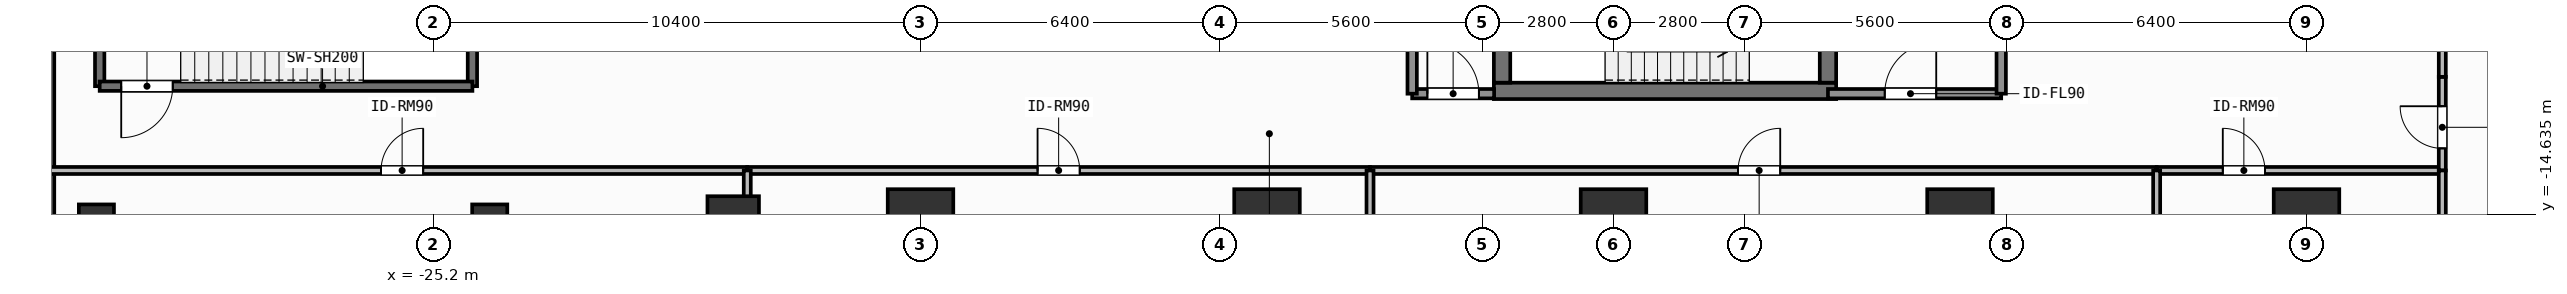
"""IFC4 building model, lengths in metres.
Left out: names, types, materials, properties, quantities, classifications, styles, units other than length and angle.
Written with IfcOpenShell. Run it as: python <this file> out.ifc"""

import sys

from ifc_helpers import new_model, si_unit, direction, frame, frame_2d, origin, origin_2d, place, context, subcontext, project, spatial, rectangle, extrude, element, fill, save


model = new_model("IFC4")
c1 = context("Model", 3, precision=1e-05, world=origin(), true_north=direction((0.0, 1.0)))
c2 = subcontext(c1, "Body", "Model", "MODEL_VIEW")
j1 = project(units=[si_unit("LENGTHUNIT", "METRE"), si_unit("PLANEANGLEUNIT", "RADIAN")], contexts=[c1])
p1 = place(None, origin())
s1 = spatial("IfcSite", under=j1, at=p1, CompositionType="ELEMENT")
p2 = place(p1, origin())
s2 = spatial("IfcBuilding", under=s1, at=p2, CompositionType="ELEMENT")
p3 = place(p2, frame((0.0, 0.0, 9.0)))
s3 = spatial("IfcBuildingStorey", under=s2, at=p3, CompositionType="ELEMENT", Elevation=9.0)
p4 = place(p3, frame((-2.555, -12.0, 0.0), z_axis=(0.0, 0.0, 1.0), x_axis=(1.0, 0.0, 0.0)))
e1 = element("IfcWall", 1, at=p4, inside=s3, PredefinedType="SHEAR", context=c2, shape_type="SweptSolid", body=[
    extrude(rectangle(XDim=7.31, YDim=0.35, at=frame_2d((3.655, 0.0))), origin(), (0.0, 0.0, 1.0), 4.2),
])
p5 = place(p3, frame((-2.38, -11.825, 0.0), z_axis=(0.0, 0.0, 1.0), x_axis=(0.0, 1.0, 0.0)))
e2 = element("IfcWall", 2, at=p5, inside=s3, PredefinedType="SHEAR", context=c2, shape_type="SweptSolid", body=[
    extrude(rectangle(XDim=2.925, YDim=0.35, at=frame_2d((1.462, 0.0))), origin(), (0.0, 0.0, 1.0), 4.2),
])
p6 = place(p3, frame((4.58, -8.9, 0.0), z_axis=(0.0, 0.0, 1.0), x_axis=(0.0, -1.0, 0.0)))
e3 = element("IfcWall", 3, at=p6, inside=s3, PredefinedType="SHEAR", context=c2, shape_type="SweptSolid", body=[
    extrude(rectangle(XDim=2.925, YDim=0.35, at=frame_2d((1.462, 0.0))), origin(), (0.0, 0.0, 1.0), 4.2),
])
p7 = place(p6, frame((0.913, 0.0, 0.0)))
e4 = element("IfcOpeningElement", 4, at=p7, cuts=e3, PredefinedType="OPENING", context=c2, shape_type="SweptSolid", body=[
    extrude(rectangle(XDim=1.1, YDim=2.15, at=frame_2d((0.55, 1.075))), frame((0.0, 0.185, 0.0), z_axis=(0.0, -1.0, 0.0), x_axis=(1.0, 0.0, 0.0)), (0.0, 0.0, 1.0), 0.37),
])
for number, where, z_axis, x_axis in (
    (5, (-14.8, -14.8, 0.0), (0.0, 0.0, 1.0), (1.0, 0.0, 0.0)),
    (6, (-7.4, -14.8, 0.0), (0.0, 0.0, 1.0), (1.0, 0.0, 0.0)),
    (7, (0.0, -14.8, 0.0), (0.0, 0.0, 1.0), (1.0, 0.0, 0.0)),
    (8, (7.4, -14.8, 0.0), (0.0, 0.0, 1.0), (1.0, 0.0, 0.0)),
    (9, (14.8, -14.8, 0.0), (0.0, 0.0, 1.0), (1.0, 0.0, 0.0)),
):
    element("IfcColumn", number, at=place(p3, frame(where, z_axis=z_axis, x_axis=x_axis)), inside=s3, PredefinedType="COLUMN", context=c2, shape_type="SweptSolid", body=[
        extrude(rectangle(XDim=1.4, YDim=1.4, at=origin_2d()), origin(), (0.0, 0.0, 1.0), 4.2),
    ])
p8 = place(p3, frame((-18.8, -14.8, 0.0), z_axis=(0.0, 0.0, 1.0), x_axis=(1.0, 0.0, 0.0)))
e10 = element("IfcColumn", 10, at=p8, inside=s3, PredefinedType="COLUMN", context=c2, shape_type="SweptSolid", body=[
    extrude(rectangle(XDim=1.1, YDim=1.1, at=origin_2d()), origin(), (0.0, 0.0, 1.0), 4.2),
])
for number, where, z_axis, x_axis in (
    (11, (-32.4, -14.8, 0.0), (0.0, 0.0, 1.0), (1.0, 0.0, 0.0)),
    (12, (-24.0, -14.8, 0.0), (0.0, 0.0, 1.0), (1.0, 0.0, 0.0)),
):
    element("IfcColumn", number, at=place(p3, frame(where, z_axis=z_axis, x_axis=x_axis)), inside=s3, PredefinedType="COLUMN", context=c2, shape_type="SweptSolid", body=[
        extrude(rectangle(XDim=0.75, YDim=0.75, at=origin_2d()), origin(), (0.0, 0.0, 1.0), 4.2),
    ])
p9 = place(p3, frame((-33.45, -20.5, 0.0), z_axis=(0.0, 0.0, 1.0), x_axis=(0.0, 1.0, 0.0)))
e13 = element("IfcWall", 13, at=p9, inside=s3, PredefinedType="SOLIDWALL", context=c2, shape_type="SweptSolid", body=[
    extrude(rectangle(XDim=14.09, YDim=0.3, at=frame_2d((7.045, 0.0))), origin(), (0.0, 0.0, 1.0), 3.96),
])
for number, where, z_axis, x_axis in (
    (14, (-32.33, -11.9, 0.0), (0.0, 0.0, 1.0), (0.0, 1.0, 0.0)),
    (15, (-24.37, -8.48, 0.0), (0.0, 0.0, 1.0), (0.0, -1.0, 0.0)),
):
    element("IfcWall", number, at=place(p3, frame(where, z_axis=z_axis, x_axis=x_axis)), inside=s3, PredefinedType="SHEAR", context=c2, shape_type="SweptSolid", body=[
        extrude(rectangle(XDim=3.42, YDim=0.2, at=frame_2d((1.71, 0.0))), origin(), (0.0, 0.0, 1.0), 3.96),
    ])
p10 = place(p3, frame((-24.37, -11.9, 0.0), z_axis=(0.0, 0.0, 1.0), x_axis=(-1.0, 0.0, 0.0)))
e16 = element("IfcWall", 16, at=p10, inside=s3, PredefinedType="SHEAR", context=c2, shape_type="SweptSolid", body=[
    extrude(rectangle(XDim=7.96, YDim=0.2, at=frame_2d((3.98, 0.0))), origin(), (0.0, 0.0, 1.0), 3.96),
])
p11 = place(p10, frame((6.4, 0.0, 0.0)))
e17 = element("IfcOpeningElement", 17, at=p11, cuts=e16, PredefinedType="OPENING", context=c2, shape_type="SweptSolid", body=[
    extrude(rectangle(XDim=1.1, YDim=2.15, at=frame_2d((0.55, 1.075))), frame((0.0, 0.11, 0.0), z_axis=(0.0, -1.0, 0.0), x_axis=(1.0, 0.0, 0.0)), (0.0, 0.0, 1.0), 0.22),
])
p12 = place(p3, frame((4.58, -12.06, 0.0), z_axis=(0.0, 0.0, 1.0), x_axis=(1.0, 0.0, 0.0)))
e18 = element("IfcWall", 18, at=p12, inside=s3, PredefinedType="SOLIDWALL", context=c2, shape_type="SweptSolid", body=[
    extrude(rectangle(XDim=3.7, YDim=0.2, at=frame_2d((1.85, 0.0))), origin(), (0.0, 0.0, 1.0), 3.96),
])
p13 = place(p12, frame((1.212, 0.0, 0.0)))
e19 = element("IfcOpeningElement", 19, at=p13, cuts=e18, PredefinedType="OPENING", context=c2, shape_type="SweptSolid", body=[
    extrude(rectangle(XDim=1.1, YDim=2.15, at=frame_2d((0.55, 1.075))), frame((0.0, 0.11, 0.0), z_axis=(0.0, -1.0, 0.0), x_axis=(1.0, 0.0, 0.0)), (0.0, 0.0, 1.0), 0.22),
])
p14 = place(p3, frame((-4.3, -12.06, 0.0), z_axis=(0.0, 0.0, 1.0), x_axis=(1.0, 0.0, 0.0)))
e20 = element("IfcWall", 20, at=p14, inside=s3, PredefinedType="SOLIDWALL", context=c2, shape_type="SweptSolid", body=[
    extrude(rectangle(XDim=1.75, YDim=0.2, at=frame_2d((0.875, 0.0))), origin(), (0.0, 0.0, 1.0), 3.96),
])
p15 = place(p14, frame((0.325, 0.0, 0.0)))
e21 = element("IfcOpeningElement", 21, at=p15, cuts=e20, PredefinedType="OPENING", context=c2, shape_type="SweptSolid", body=[
    extrude(rectangle(XDim=1.1, YDim=2.15, at=frame_2d((0.55, 1.075))), frame((0.0, 0.11, 0.0), z_axis=(0.0, -1.0, 0.0), x_axis=(1.0, 0.0, 0.0)), (0.0, 0.0, 1.0), 0.22),
])
p16 = place(p3, frame((-33.42, -13.7, 0.0), z_axis=(0.0, 0.0, 1.0), x_axis=(1.0, 0.0, 0.0)))
e22 = element("IfcWall", 22, at=p16, inside=s3, PredefinedType="PARTITIONING", context=c2, shape_type="SweptSolid", body=[
    extrude(rectangle(XDim=14.92, YDim=0.15, at=frame_2d((7.46, 0.0))), origin(), (0.0, 0.0, 1.0), 3.96),
])
p17 = place(p16, frame((7.099, 0.0, 0.0)))
e23 = element("IfcOpeningElement", 23, at=p17, cuts=e22, PredefinedType="OPENING", context=c2, shape_type="SweptSolid", body=[
    extrude(rectangle(XDim=0.9, YDim=2.1, at=frame_2d((0.45, 1.05))), frame((0.0, 0.085, 0.0), z_axis=(0.0, -1.0, 0.0), x_axis=(1.0, 0.0, 0.0)), (0.0, 0.0, 1.0), 0.17),
])
p18 = place(p3, frame((-18.5, -13.7, 0.0), z_axis=(0.0, 0.0, 1.0), x_axis=(1.0, 0.0, 0.0)))
e24 = element("IfcWall", 24, at=p18, inside=s3, PredefinedType="PARTITIONING", context=c2, shape_type="SweptSolid", body=[
    extrude(rectangle(XDim=13.3, YDim=0.15, at=frame_2d((6.65, 0.0))), origin(), (0.0, 0.0, 1.0), 3.96),
])
p19 = place(p18, frame((6.2, 0.0, 0.0)))
e25 = element("IfcOpeningElement", 25, at=p19, cuts=e24, PredefinedType="OPENING", context=c2, shape_type="SweptSolid", body=[
    extrude(rectangle(XDim=0.9, YDim=2.1, at=frame_2d((0.45, 1.05))), frame((0.0, 0.085, 0.0), z_axis=(0.0, -1.0, 0.0), x_axis=(1.0, 0.0, 0.0)), (0.0, 0.0, 1.0), 0.17),
])
p20 = place(p3, frame((-5.2, -13.7, 0.0), z_axis=(0.0, 0.0, 1.0), x_axis=(1.0, 0.0, 0.0)))
e26 = element("IfcWall", 26, at=p20, inside=s3, PredefinedType="PARTITIONING", context=c2, shape_type="SweptSolid", body=[
    extrude(rectangle(XDim=16.8, YDim=0.15, at=frame_2d((8.4, 0.0))), origin(), (0.0, 0.0, 1.0), 3.96),
])
p21 = place(p20, frame((7.861, 0.0, 0.0)))
e27 = element("IfcOpeningElement", 27, at=p21, cuts=e26, PredefinedType="OPENING", context=c2, shape_type="SweptSolid", body=[
    extrude(rectangle(XDim=0.9, YDim=2.1, at=frame_2d((0.45, 1.05))), frame((0.0, 0.085, 0.0), z_axis=(0.0, -1.0, 0.0), x_axis=(1.0, 0.0, 0.0)), (0.0, 0.0, 1.0), 0.17),
])
p22 = place(p3, frame((11.6, -13.7, 0.0), z_axis=(0.0, 0.0, 1.0), x_axis=(1.0, 0.0, 0.0)))
e28 = element("IfcWall", 28, at=p22, inside=s3, PredefinedType="PARTITIONING", context=c2, shape_type="SweptSolid", body=[
    extrude(rectangle(XDim=6.05, YDim=0.15, at=frame_2d((3.025, 0.0))), origin(), (0.0, 0.0, 1.0), 3.96),
])
p23 = place(p22, frame((1.412, 0.0, 0.0)))
e29 = element("IfcOpeningElement", 29, at=p23, cuts=e28, PredefinedType="OPENING", context=c2, shape_type="SweptSolid", body=[
    extrude(rectangle(XDim=0.9, YDim=2.1, at=frame_2d((0.45, 1.05))), frame((0.0, 0.085, 0.0), z_axis=(0.0, -1.0, 0.0), x_axis=(1.0, 0.0, 0.0)), (0.0, 0.0, 1.0), 0.17),
])
p24 = place(p3, frame((17.7, -13.7, 0.0), z_axis=(0.0, 0.0, 1.0), x_axis=(0.0, 1.0, 0.0)))
e30 = element("IfcWall", 30, at=p24, inside=s3, PredefinedType="PARTITIONING", context=c2, shape_type="SweptSolid", body=[
    extrude(rectangle(XDim=2.0, YDim=0.15, at=frame_2d((1.0, 0.0))), origin(), (0.0, 0.0, 1.0), 3.96),
])
p25 = place(p24, frame((0.472, 0.0, 0.0)))
e31 = element("IfcOpeningElement", 31, at=p25, cuts=e30, PredefinedType="OPENING", context=c2, shape_type="SweptSolid", body=[
    extrude(rectangle(XDim=0.9, YDim=2.1, at=frame_2d((0.45, 1.05))), frame((0.0, 0.085, 0.0), z_axis=(0.0, -1.0, 0.0), x_axis=(1.0, 0.0, 0.0)), (0.0, 0.0, 1.0), 0.17),
])
for number, where, z_axis, x_axis in (
    (32, (8.28, -12.06, 0.0), (0.0, 0.0, 1.0), (0.0, 1.0, 0.0)),
    (33, (-4.3, -12.06, 0.0), (0.0, 0.0, 1.0), (0.0, 1.0, 0.0)),
):
    element("IfcWall", number, at=place(p3, frame(where, z_axis=z_axis, x_axis=x_axis)), inside=s3, PredefinedType="SOLIDWALL", context=c2, shape_type="SweptSolid", body=[
        extrude(rectangle(XDim=3.11, YDim=0.2, at=frame_2d((1.555, 0.0))), origin(), (0.0, 0.0, 1.0), 3.96),
    ])
p26 = place(p3, frame((-18.5, -24.92, 0.0), z_axis=(0.0, 0.0, 1.0), x_axis=(0.0, 1.0, 0.0)))
e34 = element("IfcWall", 34, at=p26, inside=s3, PredefinedType="PARTITIONING", context=c2, shape_type="SweptSolid", body=[
    extrude(rectangle(XDim=11.22, YDim=0.15, at=frame_2d((5.61, 0.0))), origin(), (0.0, 0.0, 1.0), 3.05),
])
for number, where, z_axis, x_axis in (
    (35, (-5.2, -24.92, 0.0), (0.0, 0.0, 1.0), (0.0, 1.0, 0.0)),
    (36, (11.6, -24.92, 0.0), (0.0, 0.0, 1.0), (0.0, 1.0, 0.0)),
    (37, (17.7, -13.7, 0.0), (0.0, 0.0, 1.0), (0.0, -1.0, 0.0)),
):
    element("IfcWall", number, at=place(p3, frame(where, z_axis=z_axis, x_axis=x_axis)), inside=s3, PredefinedType="PARTITIONING", context=c2, shape_type="SweptSolid", body=[
        extrude(rectangle(XDim=11.22, YDim=0.15, at=frame_2d((5.61, 0.0))), origin(), (0.0, 0.0, 1.0), 3.96),
    ])
p27 = place(p3, frame((17.7, -11.7, 0.0), z_axis=(0.0, 0.0, 1.0), x_axis=(0.0, 1.0, 0.0)))
e38 = element("IfcWall", 38, at=p27, inside=s3, PredefinedType="PARTITIONING", context=c2, shape_type="SweptSolid", body=[
    extrude(rectangle(XDim=4.8, YDim=0.15, at=frame_2d((2.4, 0.0))), origin(), (0.0, 0.0, 1.0), 3.96),
])
p28 = place(p11, origin())
e39 = element("IfcDoor", 39, at=p28, inside=s3, OperationType="SINGLE_SWING_RIGHT", PredefinedType="DOOR", context=c2, shape_type="SweptSolid", body=[
    extrude(rectangle(XDim=1.1, YDim=2.15, at=frame_2d((0.55, 1.075))), frame((0.0, 0.025, 0.0), z_axis=(0.0, -1.0, 0.0), x_axis=(1.0, 0.0, 0.0)), (0.0, 0.0, 1.0), 0.05),
])
fill(e17, e39)
p29 = place(p13, origin())
e40 = element("IfcDoor", 40, at=p29, inside=s3, OperationType="SINGLE_SWING_RIGHT", PredefinedType="DOOR", context=c2, shape_type="SweptSolid", body=[
    extrude(rectangle(XDim=1.1, YDim=2.15, at=frame_2d((0.55, 1.075))), frame((0.0, 0.025, 0.0), z_axis=(0.0, -1.0, 0.0), x_axis=(1.0, 0.0, 0.0)), (0.0, 0.0, 1.0), 0.05),
])
fill(e19, e40)
p30 = place(p15, origin())
e41 = element("IfcDoor", 41, at=p30, inside=s3, OperationType="SINGLE_SWING_LEFT", PredefinedType="DOOR", context=c2, shape_type="SweptSolid", body=[
    extrude(rectangle(XDim=1.1, YDim=2.15, at=frame_2d((0.55, 1.075))), frame((0.0, 0.025, 0.0), z_axis=(0.0, -1.0, 0.0), x_axis=(1.0, 0.0, 0.0)), (0.0, 0.0, 1.0), 0.05),
])
fill(e21, e41)
p31 = place(p17, origin())
e42 = element("IfcDoor", 42, at=p31, inside=s3, OperationType="SINGLE_SWING_RIGHT", PredefinedType="DOOR", context=c2, shape_type="SweptSolid", body=[
    extrude(rectangle(XDim=0.9, YDim=2.1, at=frame_2d((0.45, 1.05))), frame((0.0, 0.025, 0.0), z_axis=(0.0, -1.0, 0.0), x_axis=(1.0, 0.0, 0.0)), (0.0, 0.0, 1.0), 0.05),
])
fill(e23, e42)
p32 = place(p19, origin())
e43 = element("IfcDoor", 43, at=p32, inside=s3, OperationType="SINGLE_SWING_LEFT", PredefinedType="DOOR", context=c2, shape_type="SweptSolid", body=[
    extrude(rectangle(XDim=0.9, YDim=2.1, at=frame_2d((0.45, 1.05))), frame((0.0, 0.025, 0.0), z_axis=(0.0, -1.0, 0.0), x_axis=(1.0, 0.0, 0.0)), (0.0, 0.0, 1.0), 0.05),
])
fill(e25, e43)
p33 = place(p21, origin())
e44 = element("IfcDoor", 44, at=p33, inside=s3, OperationType="SINGLE_SWING_RIGHT", PredefinedType="DOOR", context=c2, shape_type="SweptSolid", body=[
    extrude(rectangle(XDim=0.9, YDim=2.1, at=frame_2d((0.45, 1.05))), frame((0.0, 0.025, 0.0), z_axis=(0.0, -1.0, 0.0), x_axis=(1.0, 0.0, 0.0)), (0.0, 0.0, 1.0), 0.05),
])
fill(e27, e44)
p34 = place(p23, origin())
e45 = element("IfcDoor", 45, at=p34, inside=s3, OperationType="SINGLE_SWING_LEFT", PredefinedType="DOOR", context=c2, shape_type="SweptSolid", body=[
    extrude(rectangle(XDim=0.9, YDim=2.1, at=frame_2d((0.45, 1.05))), frame((0.0, 0.025, 0.0), z_axis=(0.0, -1.0, 0.0), x_axis=(1.0, 0.0, 0.0)), (0.0, 0.0, 1.0), 0.05),
])
fill(e29, e45)
p35 = place(p25, origin())
e46 = element("IfcDoor", 46, at=p35, inside=s3, OperationType="SINGLE_SWING_RIGHT", PredefinedType="DOOR", context=c2, shape_type="SweptSolid", body=[
    extrude(rectangle(XDim=0.9, YDim=2.1, at=frame_2d((0.45, 1.05))), frame((0.0, 0.025, 0.0), z_axis=(0.0, -1.0, 0.0), x_axis=(1.0, 0.0, 0.0)), (0.0, 0.0, 1.0), 0.05),
])
fill(e31, e46)
save(model, sys.argv[1])
